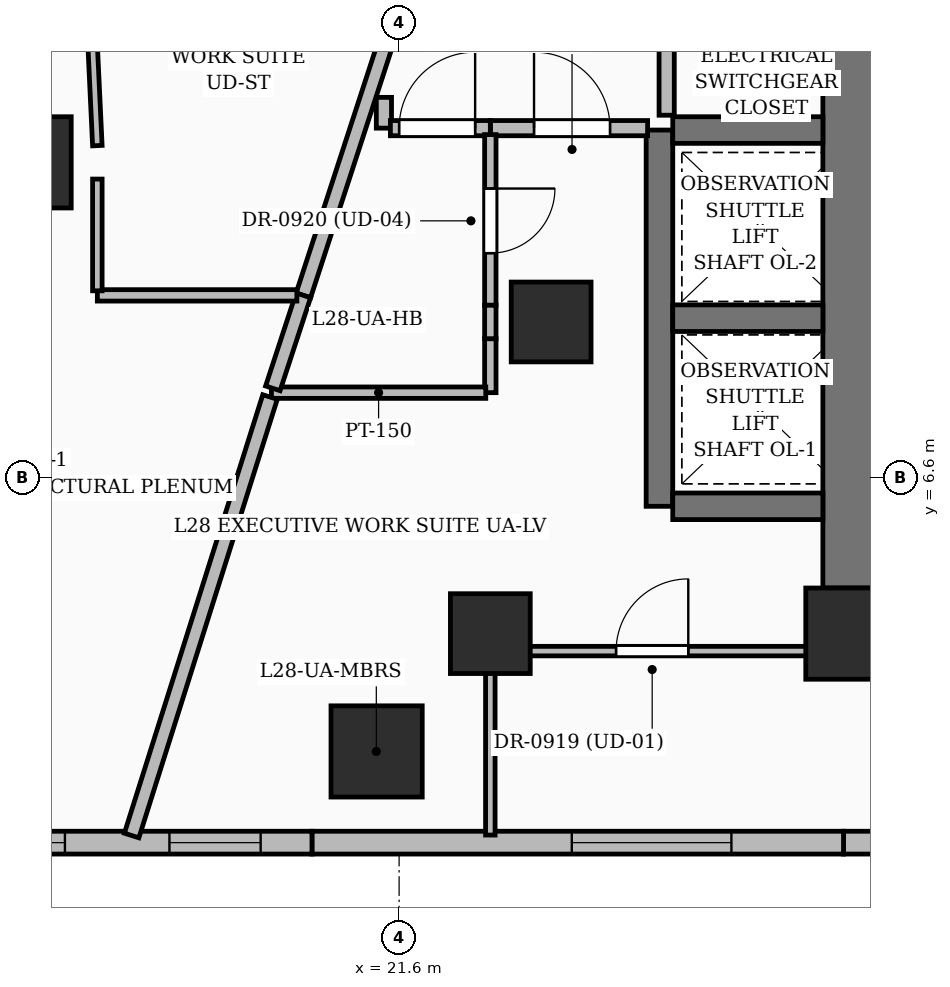
"""IFC4 building model, lengths in metres.
Left out: names, types, materials, properties, quantities, classifications, styles, units other than length and angle.
Written with IfcOpenShell. Run it as: python <this file> out.ifc"""

import sys

from ifc_helpers import new_model, si_unit, direction, frame, frame_2d, origin, origin_2d, place, context, subcontext, project, spatial, rectangle, extrude, element, fill, save


model = new_model("IFC4")
c1 = context("Model", 3, precision=1e-05, world=origin(), true_north=direction((0.0, 1.0)))
c2 = subcontext(c1, "Body", "Model", "MODEL_VIEW")
j1 = project(units=[si_unit("LENGTHUNIT", "METRE"), si_unit("PLANEANGLEUNIT", "RADIAN")], contexts=[c1])
p1 = place(None, origin())
s1 = spatial("IfcSite", under=j1, at=p1, CompositionType="ELEMENT")
p2 = place(p1, origin())
s2 = spatial("IfcBuilding", under=s1, at=p2, CompositionType="ELEMENT")
p3 = place(p2, frame((0.0, 0.0, 114.0)))
s3 = spatial("IfcBuildingStorey", under=s2, at=p3, CompositionType="ELEMENT", Elevation=114.0)
p4 = place(p3, frame((27.55, 4.55, 0.0), z_axis=(0.0, 0.0, 1.0), x_axis=(1.0, 0.0, 0.0)))
e1 = element("IfcColumn", 1, at=p4, inside=s3, PredefinedType="COLUMN", context=c2, shape_type="SweptSolid", body=[
    extrude(rectangle(XDim=1.2, YDim=1.2, at=origin_2d()), origin(), (0.0, 0.0, 1.0), 3.6),
])
for number, where, z_axis, x_axis in (
    (2, (22.8, 4.55, 0.0), (0.0, 0.0, 1.0), (1.0, 0.0, 0.0)),
    (3, (23.6, 8.65, 0.0), (0.0, 0.0, 1.0), (1.0, 0.0, 0.0)),
):
    element("IfcColumn", number, at=place(p3, frame(where, z_axis=z_axis, x_axis=x_axis)), inside=s3, PredefinedType="COLUMN", context=c2, shape_type="SweptSolid", body=[
        extrude(rectangle(XDim=1.05, YDim=1.05, at=origin_2d()), origin(), (0.0, 0.0, 1.0), 3.6),
    ])
p5 = place(p3, frame((27.55, 5.15, 0.0), z_axis=(0.0, 0.0, 1.0), x_axis=(0.0, 1.0, 0.0)))
e4 = element("IfcWall", 4, at=p5, inside=s3, PredefinedType="SHEAR", context=c2, shape_type="SweptSolid", body=[
    extrude(rectangle(XDim=9.0, YDim=0.75, at=frame_2d((4.5, 0.0))), origin(), (0.0, 0.0, 1.0), 3.6),
])
p6 = place(p3, frame((25.025, 6.225, 0.0), z_axis=(0.0, 0.0, 1.0), x_axis=(0.0, 1.0, 0.0)))
e5 = element("IfcWall", 5, at=p6, inside=s3, PredefinedType="SOLIDWALL", context=c2, shape_type="SweptSolid", body=[
    extrude(rectangle(XDim=4.95, YDim=0.35, at=frame_2d((2.475, 0.0))), origin(), (0.0, 0.0, 1.0), 3.6),
])
for number, where, z_axis, x_axis in (
    (6, (25.2, 6.225, 0.0), (0.0, 0.0, 1.0), (1.0, 0.0, 0.0)),
    (7, (25.2, 8.7, 0.0), (0.0, 0.0, 1.0), (1.0, 0.0, 0.0)),
    (8, (25.2, 11.175, 0.0), (0.0, 0.0, 1.0), (1.0, 0.0, 0.0)),
):
    element("IfcWall", number, at=place(p3, frame(where, z_axis=z_axis, x_axis=x_axis)), inside=s3, PredefinedType="SOLIDWALL", context=c2, shape_type="SweptSolid", body=[
        extrude(rectangle(XDim=1.975, YDim=0.35, at=frame_2d((0.988, 0.0))), origin(), (0.0, 0.0, 1.0), 3.6),
    ])
for number, where, z_axis, x_axis in (
    (9, (21.304, 3.0, 0.0), (0.0, 0.0, 1.0), (1.0, 0.0, 0.0)),
    (10, (16.686, 10.75, 0.0), (0.0, 0.0, 1.0), (1.0, 0.0, 0.0)),
):
    element("IfcColumn", number, at=place(p3, frame(where, z_axis=z_axis, x_axis=x_axis)), inside=s3, PredefinedType="COLUMN", context=c2, shape_type="SweptSolid", body=[
        extrude(rectangle(XDim=1.2, YDim=1.2, at=origin_2d()), origin(), (0.0, 0.0, 1.0), 3.6),
    ])
p7 = place(p3, frame((34.16, 1.8, 0.0), z_axis=(0.0, 0.0, 1.0), x_axis=(-1.0, 0.0, 0.0)))
e11 = element("IfcWall", 11, at=p7, inside=s3, PredefinedType="SOLIDWALL", context=c2, shape_type="SweptSolid", body=[
    extrude(rectangle(XDim=6.713, YDim=0.3, at=frame_2d((3.356, 0.0))), origin(), (0.0, 0.0, 1.0), 3.35),
])
p8 = place(p7, frame((1.92, 0.0, 0.6)))
e12 = element("IfcOpeningElement", 12, at=p8, cuts=e11, PredefinedType="OPENING", context=c2, shape_type="SweptSolid", body=[
    extrude(rectangle(XDim=2.4, YDim=2.1, at=frame_2d((1.2, 1.05))), frame((0.0, 0.16, 0.0), z_axis=(0.0, -1.0, 0.0), x_axis=(1.0, 0.0, 0.0)), (0.0, 0.0, 1.0), 0.32),
])
p9 = place(p3, frame((27.447, 1.8, 0.0), z_axis=(0.0, 0.0, 1.0), x_axis=(-1.0, 0.0, 0.0)))
e13 = element("IfcWall", 13, at=p9, inside=s3, PredefinedType="SOLIDWALL", context=c2, shape_type="SweptSolid", body=[
    extrude(rectangle(XDim=6.993, YDim=0.3, at=frame_2d((3.497, 0.0))), origin(), (0.0, 0.0, 1.0), 3.35),
])
p10 = place(p9, frame((1.475, 0.0, 0.55)))
e14 = element("IfcOpeningElement", 14, at=p10, cuts=e13, PredefinedType="OPENING", context=c2, shape_type="SweptSolid", body=[
    extrude(rectangle(XDim=2.1, YDim=2.4, at=frame_2d((1.05, 1.2))), frame((0.0, 0.16, 0.0), z_axis=(0.0, -1.0, 0.0), x_axis=(1.0, 0.0, 0.0)), (0.0, 0.0, 1.0), 0.32),
])
p11 = place(p3, frame((20.453, 1.8, 0.0), z_axis=(0.0, 0.0, 1.0), x_axis=(-1.0, 0.0, 0.0)))
e15 = element("IfcWall", 15, at=p11, inside=s3, PredefinedType="SOLIDWALL", context=c2, shape_type="SweptSolid", body=[
    extrude(rectangle(XDim=6.993, YDim=0.3, at=frame_2d((3.497, 0.0))), origin(), (0.0, 0.0, 1.0), 3.35),
])
p12 = place(p11, frame((0.675, 0.0, 0.8)))
e16 = element("IfcOpeningElement", 16, at=p12, cuts=e15, PredefinedType="OPENING", context=c2, shape_type="SweptSolid", body=[
    extrude(rectangle(XDim=1.2, YDim=1.8, at=frame_2d((0.6, 0.9))), frame((0.0, 0.16, 0.0), z_axis=(0.0, -1.0, 0.0), x_axis=(1.0, 0.0, 0.0)), (0.0, 0.0, 1.0), 0.32),
])
p13 = place(p11, frame((3.25, 0.0, 0.6)))
e17 = element("IfcOpeningElement", 17, at=p13, cuts=e15, PredefinedType="OPENING", context=c2, shape_type="SweptSolid", body=[
    extrude(rectangle(XDim=1.8, YDim=2.1, at=frame_2d((0.9, 1.05))), frame((0.0, 0.16, 0.0), z_axis=(0.0, -1.0, 0.0), x_axis=(1.0, 0.0, 0.0)), (0.0, 0.0, 1.0), 0.32),
])
p14 = place(p3, frame((15.262, 10.746, 0.0), z_axis=(0.0, 0.0, 1.0), x_axis=(0.534880248718, 0.844927878302, 0.0)))
e18 = element("IfcWall", 18, at=p14, inside=s3, PredefinedType="SOLIDWALL", context=c2, shape_type="SweptSolid", body=[
    extrude(rectangle(XDim=6.727, YDim=0.3, at=frame_2d((3.364, 0.0))), origin(), (0.0, 0.0, 1.0), 3.35),
])
p15 = place(p14, frame((0.875, 0.0, 0.6)))
e19 = element("IfcOpeningElement", 19, at=p15, cuts=e18, PredefinedType="OPENING", context=c2, shape_type="SweptSolid", body=[
    extrude(rectangle(XDim=1.8, YDim=2.1, at=frame_2d((0.9, 1.05))), frame((0.0, 0.16, 0.0), z_axis=(0.0, -1.0, 0.0), x_axis=(1.0, 0.0, 0.0)), (0.0, 0.0, 1.0), 0.32),
])
p16 = place(p3, frame((25.12, 11.37, 0.0), z_axis=(0.0, 0.0, 1.0), x_axis=(0.0, 1.0, 0.0)))
e20 = element("IfcWall", 20, at=p16, inside=s3, PredefinedType="PARTITIONING", context=c2, shape_type="SweptSolid", body=[
    extrude(rectangle(XDim=3.34, YDim=0.2, at=frame_2d((1.67, 0.0))), origin(), (0.0, 0.0, 1.0), 3.35),
])
p17 = place(p16, frame((1.9, 0.0, 0.0)))
e21 = element("IfcOpeningElement", 21, at=p17, cuts=e20, PredefinedType="OPENING", context=c2, shape_type="SweptSolid", body=[
    extrude(rectangle(XDim=0.9, YDim=2.1, at=frame_2d((0.45, 1.05))), frame((0.0, 0.11, 0.0), z_axis=(0.0, -1.0, 0.0), x_axis=(1.0, 0.0, 0.0)), (0.0, 0.0, 1.0), 0.22),
])
p18 = place(p3, frame((22.8, 11.2, 0.0), z_axis=(0.0, 0.0, 1.0), x_axis=(1.0, 0.0, 0.0)))
e22 = element("IfcWall", 22, at=p18, inside=s3, PredefinedType="PARTITIONING", context=c2, shape_type="SweptSolid", body=[
    extrude(rectangle(XDim=2.069, YDim=0.2, at=frame_2d((1.035, 0.0))), origin(), (0.0, 0.0, 1.0), 3.35),
])
p19 = place(p18, frame((0.575, 0.0, 0.0)))
e23 = element("IfcOpeningElement", 23, at=p19, cuts=e22, PredefinedType="OPENING", context=c2, shape_type="SweptSolid", body=[
    extrude(rectangle(XDim=1.0, YDim=2.2, at=frame_2d((0.5, 1.1))), frame((0.0, 0.11, 0.0), z_axis=(0.0, -1.0, 0.0), x_axis=(1.0, 0.0, 0.0)), (0.0, 0.0, 1.0), 0.22),
])
p20 = place(p3, frame((21.4, 11.605, 0.0), z_axis=(0.0, 0.0, 1.0), x_axis=(0.0, -1.0, 0.0)))
e24 = element("IfcWall", 24, at=p20, inside=s3, PredefinedType="PARTITIONING", context=c2, shape_type="SweptSolid", body=[
    extrude(rectangle(XDim=0.405, YDim=0.2, at=frame_2d((0.203, 0.0))), origin(), (0.0, 0.0, 1.0), 2.712),
])
p21 = place(p3, frame((21.485, 11.2, 0.0), z_axis=(0.0, 0.0, 1.0), x_axis=(1.0, 0.0, 0.0)))
e25 = element("IfcWall", 25, at=p21, inside=s3, PredefinedType="PARTITIONING", context=c2, shape_type="SweptSolid", body=[
    extrude(rectangle(XDim=1.315, YDim=0.2, at=frame_2d((0.657, 0.0))), origin(), (0.0, 0.0, 1.0), 2.712),
])
p22 = place(p21, frame((0.115, 0.0, 0.0)))
e26 = element("IfcOpeningElement", 26, at=p22, cuts=e25, PredefinedType="OPENING", context=c2, shape_type="SweptSolid", body=[
    extrude(rectangle(XDim=1.0, YDim=2.2, at=frame_2d((0.5, 1.1))), frame((0.0, 0.11, 0.0), z_axis=(0.0, -1.0, 0.0), x_axis=(1.0, 0.0, 0.0)), (0.0, 0.0, 1.0), 0.22),
])
p23 = place(p3, frame((22.8, 8.43, 0.0), z_axis=(0.0, 0.0, 1.0), x_axis=(0.0, -1.0, 0.0)))
e27 = element("IfcWall", 27, at=p23, inside=s3, PredefinedType="PARTITIONING", context=c2, shape_type="SweptSolid", body=[
    extrude(rectangle(XDim=0.71, YDim=0.15, at=frame_2d((0.355, 0.0))), origin(), (0.0, 0.0, 1.0), 3.35),
])
p24 = place(p3, frame((22.8, 11.115, 0.0), z_axis=(0.0, 0.0, 1.0), x_axis=(0.0, -1.0, 0.0)))
e28 = element("IfcWall", 28, at=p24, inside=s3, PredefinedType="PARTITIONING", context=c2, shape_type="SweptSolid", body=[
    extrude(rectangle(XDim=2.245, YDim=0.15, at=frame_2d((1.123, 0.0))), origin(), (0.0, 0.0, 1.0), 2.372),
])
p25 = place(p24, frame((0.709, 0.0, 0.0)))
e29 = element("IfcOpeningElement", 29, at=p25, cuts=e28, PredefinedType="OPENING", context=c2, shape_type="SweptSolid", body=[
    extrude(rectangle(XDim=0.85, YDim=2.1, at=frame_2d((0.425, 1.05))), frame((0.0, 0.085, 0.0), z_axis=(0.0, -1.0, 0.0), x_axis=(1.0, 0.0, 0.0)), (0.0, 0.0, 1.0), 0.17),
])
p26 = place(p3, frame((22.8, 4.32, 0.0), z_axis=(0.0, 0.0, 1.0), x_axis=(1.0, 0.0, 0.0)))
e30 = element("IfcWall", 30, at=p26, inside=s3, PredefinedType="PARTITIONING", context=c2, shape_type="SweptSolid", body=[
    extrude(rectangle(XDim=4.375, YDim=0.125, at=frame_2d((2.188, 0.0))), origin(), (0.0, 0.0, 1.0), 2.436),
])
p27 = place(p26, frame((1.654, 0.0, 0.0)))
e31 = element("IfcOpeningElement", 31, at=p27, cuts=e30, PredefinedType="OPENING", context=c2, shape_type="SweptSolid", body=[
    extrude(rectangle(XDim=0.95, YDim=2.2, at=frame_2d((0.475, 1.1))), frame((0.0, 0.072, 0.0), z_axis=(0.0, -1.0, 0.0), x_axis=(1.0, 0.0, 0.0)), (0.0, 0.0, 1.0), 0.145),
])
p28 = place(p3, frame((19.92, 7.72, 0.0), z_axis=(0.0, 0.0, 1.0), x_axis=(1.0, 0.0, 0.0)))
e32 = element("IfcWall", 32, at=p28, inside=s3, PredefinedType="PARTITIONING", context=c2, shape_type="SweptSolid", body=[
    extrude(rectangle(XDim=2.82, YDim=0.15, at=frame_2d((1.41, 0.0))), origin(), (0.0, 0.0, 1.0), 3.35),
])
p29 = place(p3, frame((21.4, 12.25, 0.0), z_axis=(0.0, 0.0, 1.0), x_axis=(-0.310029019977, -0.950727093741, 0.0)))
e33 = element("IfcWall", 33, at=p29, inside=s3, PredefinedType="PARTITIONING", context=c2, shape_type="SweptSolid", body=[
    extrude(rectangle(XDim=3.418, YDim=0.2, at=frame_2d((1.709, 0.0))), origin(), (0.0, 0.0, 1.0), 2.372),
])
p30 = place(p3, frame((20.34, 9.0, 0.0), z_axis=(0.0, 0.0, 1.0), x_axis=(-0.311842662142, -0.950133755883, 0.0)))
e34 = element("IfcWall", 34, at=p30, inside=s3, PredefinedType="PARTITIONING", context=c2, shape_type="SweptSolid", body=[
    extrude(rectangle(XDim=1.287, YDim=0.2, at=frame_2d((0.644, 0.0))), origin(), (0.0, 0.0, 1.0), 3.35),
])
p31 = place(p3, frame((22.8, 4.272, 0.0), z_axis=(0.0, 0.0, 1.0), x_axis=(0.0, -1.0, 0.0)))
e35 = element("IfcWall", 35, at=p31, inside=s3, PredefinedType="PARTITIONING", context=c2, shape_type="SweptSolid", body=[
    extrude(rectangle(XDim=2.373, YDim=0.125, at=frame_2d((1.186, 0.0))), origin(), (0.0, 0.0, 1.0), 2.57),
])
p32 = place(p3, frame((19.902, 7.663, 0.0), z_axis=(0.0, 0.0, 1.0), x_axis=(-0.300992296292, -0.953626571344, 0.0)))
e36 = element("IfcWall", 36, at=p32, inside=s3, PredefinedType="PARTITIONING", context=c2, shape_type="SweptSolid", body=[
    extrude(rectangle(XDim=6.049, YDim=0.2, at=frame_2d((3.025, 0.0))), origin(), (0.0, 0.0, 1.0), 2.57),
])
p33 = place(p3, frame((17.63, 9.0, 0.0), z_axis=(0.0, 0.0, 1.0), x_axis=(1.0, 0.0, 0.0)))
e37 = element("IfcWall", 37, at=p33, inside=s3, PredefinedType="PARTITIONING", context=c2, shape_type="SweptSolid", body=[
    extrude(rectangle(XDim=2.625, YDim=0.15, at=frame_2d((1.312, 0.0))), origin(), (0.0, 0.0, 1.0), 2.57),
])
p34 = place(p3, frame((17.63, 10.53, 0.0), z_axis=(0.0, 0.0, 1.0), x_axis=(0.0, -1.0, 0.0)))
e38 = element("IfcWall", 38, at=p34, inside=s3, PredefinedType="PARTITIONING", context=c2, shape_type="SweptSolid", body=[
    extrude(rectangle(XDim=1.47, YDim=0.125, at=frame_2d((0.735, 0.0))), origin(), (0.0, 0.0, 1.0), 2.372),
])
p35 = place(p3, frame((17.487, 14.013, 0.0), z_axis=(0.0, 0.0, 1.0), x_axis=(0.046883561563, -0.998900361225, 0.0)))
e39 = element("IfcWall", 39, at=p35, inside=s3, PredefinedType="PARTITIONING", context=c2, shape_type="SweptSolid", body=[
    extrude(rectangle(XDim=3.046, YDim=0.125, at=frame_2d((1.523, 0.0))), origin(), (0.0, 0.0, 1.0), 2.57),
])
p36 = place(p3, frame((22.8, 8.43, 0.0), z_axis=(0.0, 0.0, 1.0), x_axis=(0.0, 1.0, 0.0)))
e40 = element("IfcWall", 40, at=p36, inside=s3, PredefinedType="PARTITIONING", context=c2, shape_type="SweptSolid", body=[
    extrude(rectangle(XDim=0.44, YDim=0.15, at=frame_2d((0.22, 0.0))), origin(), (0.0, 0.0, 1.0), 2.372),
])
p37 = place(p10, origin())
e41 = element("IfcWindow", 41, at=p37, inside=s3, PartitioningType="SINGLE_PANEL", PredefinedType="WINDOW", context=c2, shape_type="SweptSolid", body=[
    extrude(rectangle(XDim=2.1, YDim=2.4, at=frame_2d((1.05, 1.2))), frame((0.0, 0.03, 0.0), z_axis=(0.0, -1.0, 0.0), x_axis=(1.0, 0.0, 0.0)), (0.0, 0.0, 1.0), 0.06),
])
fill(e14, e41)
p38 = place(p12, origin())
e42 = element("IfcWindow", 42, at=p38, inside=s3, PartitioningType="SINGLE_PANEL", PredefinedType="WINDOW", context=c2, shape_type="SweptSolid", body=[
    extrude(rectangle(XDim=1.2, YDim=1.8, at=frame_2d((0.6, 0.9))), frame((0.0, 0.03, 0.0), z_axis=(0.0, -1.0, 0.0), x_axis=(1.0, 0.0, 0.0)), (0.0, 0.0, 1.0), 0.06),
])
fill(e16, e42)
p39 = place(p13, origin())
e43 = element("IfcWindow", 43, at=p39, inside=s3, PartitioningType="SINGLE_PANEL", PredefinedType="WINDOW", context=c2, shape_type="SweptSolid", body=[
    extrude(rectangle(XDim=1.8, YDim=2.1, at=frame_2d((0.9, 1.05))), frame((0.0, 0.03, 0.0), z_axis=(0.0, -1.0, 0.0), x_axis=(1.0, 0.0, 0.0)), (0.0, 0.0, 1.0), 0.06),
])
fill(e17, e43)
p40 = place(p19, origin())
e44 = element("IfcDoor", 44, at=p40, inside=s3, OperationType="SINGLE_SWING_LEFT", PredefinedType="DOOR", context=c2, shape_type="SweptSolid", body=[
    extrude(rectangle(XDim=1.0, YDim=2.2, at=frame_2d((0.5, 1.1))), frame((0.0, 0.025, 0.0), z_axis=(0.0, -1.0, 0.0), x_axis=(1.0, 0.0, 0.0)), (0.0, 0.0, 1.0), 0.05),
])
fill(e23, e44)
p41 = place(p27, origin())
e45 = element("IfcDoor", 45, at=p41, inside=s3, OperationType="SINGLE_SWING_RIGHT", PredefinedType="DOOR", context=c2, shape_type="SweptSolid", body=[
    extrude(rectangle(XDim=0.95, YDim=2.2, at=frame_2d((0.475, 1.1))), frame((0.0, 0.025, 0.0), z_axis=(0.0, -1.0, 0.0), x_axis=(1.0, 0.0, 0.0)), (0.0, 0.0, 1.0), 0.05),
])
fill(e31, e45)
p42 = place(p25, origin())
e46 = element("IfcDoor", 46, at=p42, inside=s3, OperationType="SINGLE_SWING_LEFT", PredefinedType="DOOR", context=c2, shape_type="SweptSolid", body=[
    extrude(rectangle(XDim=0.85, YDim=2.1, at=frame_2d((0.425, 1.05))), frame((0.0, 0.025, 0.0), z_axis=(0.0, -1.0, 0.0), x_axis=(1.0, 0.0, 0.0)), (0.0, 0.0, 1.0), 0.05),
])
fill(e29, e46)
p43 = place(p22, origin())
e47 = element("IfcDoor", 47, at=p43, inside=s3, OperationType="SINGLE_SWING_RIGHT", PredefinedType="DOOR", context=c2, shape_type="SweptSolid", body=[
    extrude(rectangle(XDim=1.0, YDim=2.2, at=frame_2d((0.5, 1.1))), frame((0.0, 0.025, 0.0), z_axis=(0.0, -1.0, 0.0), x_axis=(1.0, 0.0, 0.0)), (0.0, 0.0, 1.0), 0.05),
])
fill(e26, e47)
save(model, sys.argv[1])
